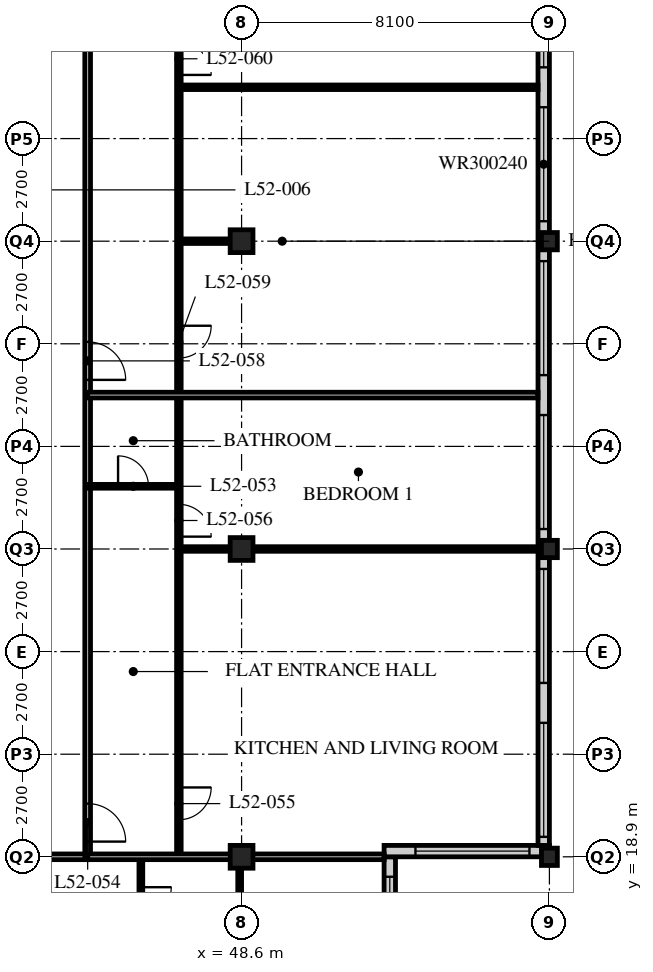
"""IFC4 building model, lengths in metres.
Left out: names, types, materials, properties, quantities, classifications, styles, units other than length and angle.
Written with IfcOpenShell. Run it as: python <this file> out.ifc"""

import sys

from ifc_helpers import new_model, si_unit, direction, frame, frame_2d, origin, origin_2d, place, context, subcontext, project, spatial, rectangle, hollow_rectangle, i_section, extrude, element, fill, save


model = new_model("IFC4")
c1 = context("Model", 3, precision=1e-05, world=origin(), true_north=direction((0.0, 1.0)))
c2 = subcontext(c1, "Body", "Model", "MODEL_VIEW")
j1 = project(units=[si_unit("LENGTHUNIT", "METRE"), si_unit("PLANEANGLEUNIT", "RADIAN")], contexts=[c1])
p1 = place(None, origin())
s1 = spatial("IfcSite", under=j1, at=p1, CompositionType="ELEMENT")
p2 = place(p1, origin())
s2 = spatial("IfcBuilding", under=s1, at=p2, CompositionType="ELEMENT")
p3 = place(p2, frame((0.0, 0.0, 202.8)))
s3 = spatial("IfcBuildingStorey", under=s2, at=p3, CompositionType="ELEMENT", Elevation=202.8)
for number, where, z_axis, x_axis in (
    (1, (48.6, 18.9, 0.0), (0.0, 0.0, 1.0), (1.0, 0.0, 0.0)),
    (2, (48.6, 27.0, 0.0), (0.0, 0.0, 1.0), (1.0, 0.0, 0.0)),
    (3, (48.6, 35.1, 0.0), (0.0, 0.0, 1.0), (1.0, 0.0, 0.0)),
):
    element("IfcColumn", number, at=place(p3, frame(where, z_axis=z_axis, x_axis=x_axis)), inside=s3, PredefinedType="COLUMN", context=c2, shape_type="SweptSolid", body=[
        extrude(hollow_rectangle(XDim=0.6, YDim=0.6, WallThickness=0.05, at=origin_2d()), origin(), (0.0, 0.0, 1.0), 3.6),
    ])
for number, where, z_axis, x_axis in (
    (4, (56.7, 18.9, 0.0), (0.0, 0.0, 1.0), (1.0, 0.0, 0.0)),
    (5, (56.7, 27.0, 0.0), (0.0, 0.0, 1.0), (1.0, 0.0, 0.0)),
    (6, (56.7, 35.1, 0.0), (0.0, 0.0, 1.0), (1.0, 0.0, 0.0)),
):
    element("IfcColumn", number, at=place(p3, frame(where, z_axis=z_axis, x_axis=x_axis)), inside=s3, PredefinedType="COLUMN", context=c2, shape_type="SweptSolid", body=[
        extrude(i_section(OverallWidth=0.418, OverallDepth=0.456, WebThickness=0.042, FlangeThickness=0.067, FilletRadius=0.015, at=origin_2d()), origin(), (0.0, 0.0, 1.0), 3.6),
    ])
p4 = place(p3, frame((52.5, 15.15, 0.0), z_axis=(0.0, 0.0, 1.0), x_axis=(0.0, 1.0, 0.0)))
e7 = element("IfcWall", 7, at=p4, inside=s3, PredefinedType="SOLIDWALL", context=c2, shape_type="SweptSolid", body=[
    extrude(rectangle(XDim=3.75, YDim=0.3, at=frame_2d((1.875, 0.0))), origin(), (0.0, 0.0, 1.0), 3.39),
])
p5 = place(p4, frame((0.225, 0.0, 0.6)))
e8 = element("IfcOpeningElement", 8, at=p5, cuts=e7, PredefinedType="OPENING", context=c2, shape_type="SweptSolid", body=[
    extrude(rectangle(XDim=3.0, YDim=2.0, at=frame_2d((1.5, 1.0))), frame((0.0, 0.16, 0.0), z_axis=(0.0, -1.0, 0.0), x_axis=(1.0, 0.0, 0.0)), (0.0, 0.0, 1.0), 0.32),
])
p6 = place(p3, frame((52.35, 19.05, 0.0), z_axis=(0.0, 0.0, 1.0), x_axis=(1.0, 0.0, 0.0)))
e9 = element("IfcWall", 9, at=p6, inside=s3, PredefinedType="SOLIDWALL", context=c2, shape_type="SweptSolid", body=[
    extrude(rectangle(XDim=4.35, YDim=0.3, at=frame_2d((2.175, 0.0))), origin(), (0.0, 0.0, 1.0), 3.39),
])
p7 = place(p6, frame((0.825, 0.0, 0.6)))
e10 = element("IfcOpeningElement", 10, at=p7, cuts=e9, PredefinedType="OPENING", context=c2, shape_type="SweptSolid", body=[
    extrude(rectangle(XDim=3.0, YDim=2.0, at=frame_2d((1.5, 1.0))), frame((0.0, 0.16, 0.0), z_axis=(0.0, -1.0, 0.0), x_axis=(1.0, 0.0, 0.0)), (0.0, 0.0, 1.0), 0.32),
])
p8 = place(p3, frame((56.55, 19.2, 0.0), z_axis=(0.0, 0.0, 1.0), x_axis=(0.0, 1.0, 0.0)))
e11 = element("IfcWall", 11, at=p8, inside=s3, PredefinedType="SOLIDWALL", context=c2, shape_type="SweptSolid", body=[
    extrude(rectangle(XDim=32.1, YDim=0.3, at=frame_2d((16.05, 0.0))), origin(), (0.0, 0.0, 1.0), 3.39),
])
p9 = place(p8, frame((0.225, 0.0, 0.6)))
e12 = element("IfcOpeningElement", 12, at=p9, cuts=e11, PredefinedType="OPENING", context=c2, shape_type="SweptSolid", body=[
    extrude(rectangle(XDim=3.0, YDim=2.4, at=frame_2d((1.5, 1.2))), frame((0.0, 0.16, 0.0), z_axis=(0.0, -1.0, 0.0), x_axis=(1.0, 0.0, 0.0)), (0.0, 0.0, 1.0), 0.32),
])
p10 = place(p8, frame((4.275, 0.0, 0.6)))
e13 = element("IfcOpeningElement", 13, at=p10, cuts=e11, PredefinedType="OPENING", context=c2, shape_type="SweptSolid", body=[
    extrude(rectangle(XDim=3.0, YDim=2.4, at=frame_2d((1.5, 1.2))), frame((0.0, 0.16, 0.0), z_axis=(0.0, -1.0, 0.0), x_axis=(1.0, 0.0, 0.0)), (0.0, 0.0, 1.0), 0.32),
])
p11 = place(p8, frame((8.325, 0.0, 0.6)))
e14 = element("IfcOpeningElement", 14, at=p11, cuts=e11, PredefinedType="OPENING", context=c2, shape_type="SweptSolid", body=[
    extrude(rectangle(XDim=3.0, YDim=2.4, at=frame_2d((1.5, 1.2))), frame((0.0, 0.16, 0.0), z_axis=(0.0, -1.0, 0.0), x_axis=(1.0, 0.0, 0.0)), (0.0, 0.0, 1.0), 0.32),
])
p12 = place(p8, frame((12.375, 0.0, 0.6)))
e15 = element("IfcOpeningElement", 15, at=p12, cuts=e11, PredefinedType="OPENING", context=c2, shape_type="SweptSolid", body=[
    extrude(rectangle(XDim=3.0, YDim=2.4, at=frame_2d((1.5, 1.2))), frame((0.0, 0.16, 0.0), z_axis=(0.0, -1.0, 0.0), x_axis=(1.0, 0.0, 0.0)), (0.0, 0.0, 1.0), 0.32),
])
p13 = place(p8, frame((16.425, 0.0, 0.6)))
e16 = element("IfcOpeningElement", 16, at=p13, cuts=e11, PredefinedType="OPENING", context=c2, shape_type="SweptSolid", body=[
    extrude(rectangle(XDim=3.0, YDim=2.4, at=frame_2d((1.5, 1.2))), frame((0.0, 0.16, 0.0), z_axis=(0.0, -1.0, 0.0), x_axis=(1.0, 0.0, 0.0)), (0.0, 0.0, 1.0), 0.32),
])
p14 = place(p8, frame((20.475, 0.0, 0.6)))
e17 = element("IfcOpeningElement", 17, at=p14, cuts=e11, PredefinedType="OPENING", context=c2, shape_type="SweptSolid", body=[
    extrude(rectangle(XDim=3.0, YDim=2.4, at=frame_2d((1.5, 1.2))), frame((0.0, 0.16, 0.0), z_axis=(0.0, -1.0, 0.0), x_axis=(1.0, 0.0, 0.0)), (0.0, 0.0, 1.0), 0.32),
])
p15 = place(p8, frame((24.525, 0.0, 0.6)))
e18 = element("IfcOpeningElement", 18, at=p15, cuts=e11, PredefinedType="OPENING", context=c2, shape_type="SweptSolid", body=[
    extrude(rectangle(XDim=3.0, YDim=2.4, at=frame_2d((1.5, 1.2))), frame((0.0, 0.16, 0.0), z_axis=(0.0, -1.0, 0.0), x_axis=(1.0, 0.0, 0.0)), (0.0, 0.0, 1.0), 0.32),
])
p16 = place(p8, frame((28.575, 0.0, 0.6)))
e19 = element("IfcOpeningElement", 19, at=p16, cuts=e11, PredefinedType="OPENING", context=c2, shape_type="SweptSolid", body=[
    extrude(rectangle(XDim=3.0, YDim=2.4, at=frame_2d((1.5, 1.2))), frame((0.0, 0.16, 0.0), z_axis=(0.0, -1.0, 0.0), x_axis=(1.0, 0.0, 0.0)), (0.0, 0.0, 1.0), 0.32),
])
p17 = place(p3, frame((8.1, 18.9, 0.0), z_axis=(0.0, 0.0, 1.0), x_axis=(1.0, 0.0, 0.0)))
e20 = element("IfcWall", 20, at=p17, inside=s3, PredefinedType="PARTITIONING", context=c2, shape_type="SweptSolid", body=[
    extrude(rectangle(XDim=36.45, YDim=0.15, at=frame_2d((18.225, 0.0))), origin(), (0.0, 0.0, 1.0), 2.778),
])
p18 = place(p17, frame((4.45, 0.0, 0.0)))
e21 = element("IfcOpeningElement", 21, at=p18, cuts=e20, PredefinedType="OPENING", context=c2, shape_type="SweptSolid", body=[
    extrude(rectangle(XDim=1.0, YDim=2.1, at=frame_2d((0.5, 1.05))), frame((0.0, 0.085, 0.0), z_axis=(0.0, -1.0, 0.0), x_axis=(1.0, 0.0, 0.0)), (0.0, 0.0, 1.0), 0.17),
])
p19 = place(p17, frame((12.55, 0.0, 0.0)))
e22 = element("IfcOpeningElement", 22, at=p19, cuts=e20, PredefinedType="OPENING", context=c2, shape_type="SweptSolid", body=[
    extrude(rectangle(XDim=1.0, YDim=2.1, at=frame_2d((0.5, 1.05))), frame((0.0, 0.085, 0.0), z_axis=(0.0, -1.0, 0.0), x_axis=(1.0, 0.0, 0.0)), (0.0, 0.0, 1.0), 0.17),
])
p20 = place(p17, frame((29.05, 0.0, 0.0)))
e23 = element("IfcOpeningElement", 23, at=p20, cuts=e20, PredefinedType="OPENING", context=c2, shape_type="SweptSolid", body=[
    extrude(rectangle(XDim=1.0, YDim=2.1, at=frame_2d((0.5, 1.05))), frame((0.0, 0.085, 0.0), z_axis=(0.0, -1.0, 0.0), x_axis=(1.0, 0.0, 0.0)), (0.0, 0.0, 1.0), 0.17),
])
p21 = place(p17, frame((2.625, 0.0, 0.0)))
e24 = element("IfcOpeningElement", 24, at=p21, cuts=e20, PredefinedType="OPENING", context=c2, shape_type="SweptSolid", body=[
    extrude(rectangle(XDim=1.0, YDim=2.1, at=frame_2d((0.5, 1.05))), frame((0.0, 0.085, 0.0), z_axis=(0.0, -1.0, 0.0), x_axis=(1.0, 0.0, 0.0)), (0.0, 0.0, 1.0), 0.17),
])
p22 = place(p17, frame((33.925, 0.0, 0.0)))
e25 = element("IfcOpeningElement", 25, at=p22, cuts=e20, PredefinedType="OPENING", context=c2, shape_type="SweptSolid", body=[
    extrude(rectangle(XDim=1.0, YDim=2.1, at=frame_2d((0.5, 1.05))), frame((0.0, 0.085, 0.0), z_axis=(0.0, -1.0, 0.0), x_axis=(1.0, 0.0, 0.0)), (0.0, 0.0, 1.0), 0.17),
])
p23 = place(p3, frame((44.55, 18.9, 0.0), z_axis=(0.0, 0.0, 1.0), x_axis=(0.0, 1.0, 0.0)))
e26 = element("IfcWall", 26, at=p23, inside=s3, PredefinedType="PARTITIONING", context=c2, shape_type="SweptSolid", body=[
    extrude(rectangle(XDim=28.35, YDim=0.15, at=frame_2d((14.175, 0.0))), origin(), (0.0, 0.0, 1.0), 3.39),
])
p24 = place(p23, frame((0.4, 0.0, 0.0)))
e27 = element("IfcOpeningElement", 27, at=p24, cuts=e26, PredefinedType="OPENING", context=c2, shape_type="SweptSolid", body=[
    extrude(rectangle(XDim=1.0, YDim=2.1, at=frame_2d((0.5, 1.05))), frame((0.0, 0.085, 0.0), z_axis=(0.0, -1.0, 0.0), x_axis=(1.0, 0.0, 0.0)), (0.0, 0.0, 1.0), 0.17),
])
p25 = place(p23, frame((12.55, 0.0, 0.0)))
e28 = element("IfcOpeningElement", 28, at=p25, cuts=e26, PredefinedType="OPENING", context=c2, shape_type="SweptSolid", body=[
    extrude(rectangle(XDim=1.0, YDim=2.1, at=frame_2d((0.5, 1.05))), frame((0.0, 0.085, 0.0), z_axis=(0.0, -1.0, 0.0), x_axis=(1.0, 0.0, 0.0)), (0.0, 0.0, 1.0), 0.17),
])
p26 = place(p23, frame((26.65, 0.0, 0.0)))
e29 = element("IfcOpeningElement", 29, at=p26, cuts=e26, PredefinedType="OPENING", context=c2, shape_type="SweptSolid", body=[
    extrude(rectangle(XDim=1.0, YDim=2.1, at=frame_2d((0.5, 1.05))), frame((0.0, 0.085, 0.0), z_axis=(0.0, -1.0, 0.0), x_axis=(1.0, 0.0, 0.0)), (0.0, 0.0, 1.0), 0.17),
])
p27 = place(p3, frame((46.95, 18.9, 0.0), z_axis=(0.0, 0.0, 1.0), x_axis=(0.0, 1.0, 0.0)))
e30 = element("IfcWall", 30, at=p27, inside=s3, PredefinedType="PARTITIONING", context=c2, shape_type="SweptSolid", body=[
    extrude(rectangle(XDim=24.3, YDim=0.12, at=frame_2d((12.15, 0.0))), origin(), (0.0, 0.0, 1.0), 3.39),
])
p28 = place(p27, frame((0.975, 0.0, 0.0)))
e31 = element("IfcOpeningElement", 31, at=p28, cuts=e30, PredefinedType="OPENING", context=c2, shape_type="SweptSolid", body=[
    extrude(rectangle(XDim=0.85, YDim=2.1, at=frame_2d((0.425, 1.05))), frame((0.0, 0.07, 0.0), z_axis=(0.0, -1.0, 0.0), x_axis=(1.0, 0.0, 0.0)), (0.0, 0.0, 1.0), 0.14),
])
p29 = place(p27, frame((8.425, 0.0, 0.0)))
e32 = element("IfcOpeningElement", 32, at=p29, cuts=e30, PredefinedType="OPENING", context=c2, shape_type="SweptSolid", body=[
    extrude(rectangle(XDim=0.85, YDim=2.1, at=frame_2d((0.425, 1.05))), frame((0.0, 0.07, 0.0), z_axis=(0.0, -1.0, 0.0), x_axis=(1.0, 0.0, 0.0)), (0.0, 0.0, 1.0), 0.14),
])
p30 = place(p27, frame((13.125, 0.0, 0.0)))
e33 = element("IfcOpeningElement", 33, at=p30, cuts=e30, PredefinedType="OPENING", context=c2, shape_type="SweptSolid", body=[
    extrude(rectangle(XDim=0.85, YDim=2.1, at=frame_2d((0.425, 1.05))), frame((0.0, 0.07, 0.0), z_axis=(0.0, -1.0, 0.0), x_axis=(1.0, 0.0, 0.0)), (0.0, 0.0, 1.0), 0.14),
])
p31 = place(p27, frame((20.575, 0.0, 0.0)))
e34 = element("IfcOpeningElement", 34, at=p31, cuts=e30, PredefinedType="OPENING", context=c2, shape_type="SweptSolid", body=[
    extrude(rectangle(XDim=0.85, YDim=2.1, at=frame_2d((0.425, 1.05))), frame((0.0, 0.07, 0.0), z_axis=(0.0, -1.0, 0.0), x_axis=(1.0, 0.0, 0.0)), (0.0, 0.0, 1.0), 0.14),
])
p32 = place(p3, frame((44.55, 28.65, 0.0), z_axis=(0.0, 0.0, 1.0), x_axis=(1.0, 0.0, 0.0)))
e35 = element("IfcWall", 35, at=p32, inside=s3, PredefinedType="PARTITIONING", context=c2, shape_type="SweptSolid", body=[
    extrude(rectangle(XDim=2.4, YDim=0.1, at=frame_2d((1.2, 0.0))), origin(), (0.0, 0.0, 1.0), 3.39),
])
p33 = place(p32, frame((0.8, 0.0, 0.0)))
e36 = element("IfcOpeningElement", 36, at=p33, cuts=e35, PredefinedType="OPENING", context=c2, shape_type="SweptSolid", body=[
    extrude(rectangle(XDim=0.8, YDim=2.1, at=frame_2d((0.4, 1.05))), frame((0.0, 0.06, 0.0), z_axis=(0.0, -1.0, 0.0), x_axis=(1.0, 0.0, 0.0)), (0.0, 0.0, 1.0), 0.12),
])
p34 = place(p3, frame((46.95, 27.0, 0.0), z_axis=(0.0, 0.0, 1.0), x_axis=(1.0, 0.0, 0.0)))
e37 = element("IfcWall", 37, at=p34, inside=s3, PredefinedType="PARTITIONING", context=c2, shape_type="SweptSolid", body=[
    extrude(rectangle(XDim=9.45, YDim=0.12, at=frame_2d((4.725, 0.0))), origin(), (0.0, 0.0, 1.0), 2.778),
])
p35 = place(p3, frame((44.55, 31.05, 0.0), z_axis=(0.0, 0.0, 1.0), x_axis=(1.0, 0.0, 0.0)))
e38 = element("IfcWall", 38, at=p35, inside=s3, PredefinedType="PARTITIONING", context=c2, shape_type="SweptSolid", body=[
    extrude(rectangle(XDim=11.85, YDim=0.15, at=frame_2d((5.925, 0.0))), origin(), (0.0, 0.0, 1.0), 3.39),
])
p36 = place(p3, frame((46.95, 39.15, 0.0), z_axis=(0.0, 0.0, 1.0), x_axis=(1.0, 0.0, 0.0)))
e39 = element("IfcWall", 39, at=p36, inside=s3, PredefinedType="PARTITIONING", context=c2, shape_type="SweptSolid", body=[
    extrude(rectangle(XDim=9.45, YDim=0.12, at=frame_2d((4.725, 0.0))), origin(), (0.0, 0.0, 1.0), 3.39),
])
p37 = place(p3, frame((45.95, 18.9, 0.0), z_axis=(0.0, 0.0, 1.0), x_axis=(0.0, -1.0, 0.0)))
e40 = element("IfcWall", 40, at=p37, inside=s3, PredefinedType="PARTITIONING", context=c2, shape_type="SweptSolid", body=[
    extrude(rectangle(XDim=2.4, YDim=0.1, at=frame_2d((1.2, 0.0))), origin(), (0.0, 0.0, 1.0), 3.39),
])
p38 = place(p37, frame((0.8, 0.0, 0.0)))
e41 = element("IfcOpeningElement", 41, at=p38, cuts=e40, PredefinedType="OPENING", context=c2, shape_type="SweptSolid", body=[
    extrude(rectangle(XDim=0.8, YDim=2.1, at=frame_2d((0.4, 1.05))), frame((0.0, 0.06, 0.0), z_axis=(0.0, -1.0, 0.0), x_axis=(1.0, 0.0, 0.0)), (0.0, 0.0, 1.0), 0.12),
])
p39 = place(p3, frame((48.55, 18.9, 0.0), z_axis=(0.0, 0.0, 1.0), x_axis=(0.0, -1.0, 0.0)))
e42 = element("IfcWall", 42, at=p39, inside=s3, PredefinedType="PARTITIONING", context=c2, shape_type="SweptSolid", body=[
    extrude(rectangle(XDim=2.4, YDim=0.1, at=frame_2d((1.2, 0.0))), origin(), (0.0, 0.0, 1.0), 2.778),
])
p40 = place(p3, frame((44.55, 18.9, 0.0), z_axis=(0.0, 0.0, 1.0), x_axis=(1.0, 0.0, 0.0)))
e43 = element("IfcWall", 43, at=p40, inside=s3, PredefinedType="PARTITIONING", context=c2, shape_type="SweptSolid", body=[
    extrude(rectangle(XDim=7.8, YDim=0.15, at=frame_2d((3.9, 0.0))), origin(), (0.0, 0.0, 1.0), 2.778),
])
p41 = place(p3, frame((46.95, 35.1, 0.0), z_axis=(0.0, 0.0, 1.0), x_axis=(1.0, 0.0, 0.0)))
e44 = element("IfcWall", 44, at=p41, inside=s3, PredefinedType="PARTITIONING", context=c2, shape_type="SweptSolid", body=[
    extrude(rectangle(XDim=1.35, YDim=0.12, at=frame_2d((0.675, 0.0))), origin(), (0.0, 0.0, 1.0), 2.778),
])
p42 = place(p5, origin())
e45 = element("IfcWindow", 45, at=p42, inside=s3, PartitioningType="SINGLE_PANEL", PredefinedType="WINDOW", context=c2, shape_type="SweptSolid", body=[
    extrude(rectangle(XDim=3.0, YDim=2.0, at=frame_2d((1.5, 1.0))), frame((0.0, 0.03, 0.0), z_axis=(0.0, -1.0, 0.0), x_axis=(1.0, 0.0, 0.0)), (0.0, 0.0, 1.0), 0.06),
])
fill(e8, e45)
p43 = place(p7, origin())
e46 = element("IfcWindow", 46, at=p43, inside=s3, PartitioningType="SINGLE_PANEL", PredefinedType="WINDOW", context=c2, shape_type="SweptSolid", body=[
    extrude(rectangle(XDim=3.0, YDim=2.0, at=frame_2d((1.5, 1.0))), frame((0.0, 0.03, 0.0), z_axis=(0.0, -1.0, 0.0), x_axis=(1.0, 0.0, 0.0)), (0.0, 0.0, 1.0), 0.06),
])
fill(e10, e46)
p44 = place(p9, origin())
e47 = element("IfcWindow", 47, at=p44, inside=s3, PartitioningType="SINGLE_PANEL", PredefinedType="WINDOW", context=c2, shape_type="SweptSolid", body=[
    extrude(rectangle(XDim=3.0, YDim=2.4, at=frame_2d((1.5, 1.2))), frame((0.0, 0.03, 0.0), z_axis=(0.0, -1.0, 0.0), x_axis=(1.0, 0.0, 0.0)), (0.0, 0.0, 1.0), 0.06),
])
fill(e12, e47)
p45 = place(p10, origin())
e48 = element("IfcWindow", 48, at=p45, inside=s3, PartitioningType="SINGLE_PANEL", PredefinedType="WINDOW", context=c2, shape_type="SweptSolid", body=[
    extrude(rectangle(XDim=3.0, YDim=2.4, at=frame_2d((1.5, 1.2))), frame((0.0, 0.03, 0.0), z_axis=(0.0, -1.0, 0.0), x_axis=(1.0, 0.0, 0.0)), (0.0, 0.0, 1.0), 0.06),
])
fill(e13, e48)
p46 = place(p11, origin())
e49 = element("IfcWindow", 49, at=p46, inside=s3, PartitioningType="SINGLE_PANEL", PredefinedType="WINDOW", context=c2, shape_type="SweptSolid", body=[
    extrude(rectangle(XDim=3.0, YDim=2.4, at=frame_2d((1.5, 1.2))), frame((0.0, 0.03, 0.0), z_axis=(0.0, -1.0, 0.0), x_axis=(1.0, 0.0, 0.0)), (0.0, 0.0, 1.0), 0.06),
])
fill(e14, e49)
p47 = place(p12, origin())
e50 = element("IfcWindow", 50, at=p47, inside=s3, PartitioningType="SINGLE_PANEL", PredefinedType="WINDOW", context=c2, shape_type="SweptSolid", body=[
    extrude(rectangle(XDim=3.0, YDim=2.4, at=frame_2d((1.5, 1.2))), frame((0.0, 0.03, 0.0), z_axis=(0.0, -1.0, 0.0), x_axis=(1.0, 0.0, 0.0)), (0.0, 0.0, 1.0), 0.06),
])
fill(e15, e50)
p48 = place(p13, origin())
e51 = element("IfcWindow", 51, at=p48, inside=s3, PartitioningType="SINGLE_PANEL", PredefinedType="WINDOW", context=c2, shape_type="SweptSolid", body=[
    extrude(rectangle(XDim=3.0, YDim=2.4, at=frame_2d((1.5, 1.2))), frame((0.0, 0.03, 0.0), z_axis=(0.0, -1.0, 0.0), x_axis=(1.0, 0.0, 0.0)), (0.0, 0.0, 1.0), 0.06),
])
fill(e16, e51)
p49 = place(p14, origin())
e52 = element("IfcWindow", 52, at=p49, inside=s3, PartitioningType="SINGLE_PANEL", PredefinedType="WINDOW", context=c2, shape_type="SweptSolid", body=[
    extrude(rectangle(XDim=3.0, YDim=2.4, at=frame_2d((1.5, 1.2))), frame((0.0, 0.03, 0.0), z_axis=(0.0, -1.0, 0.0), x_axis=(1.0, 0.0, 0.0)), (0.0, 0.0, 1.0), 0.06),
])
fill(e17, e52)
p50 = place(p33, origin())
e53 = element("IfcDoor", 53, at=p50, inside=s3, OperationType="SINGLE_SWING_LEFT", PredefinedType="DOOR", context=c2, shape_type="SweptSolid", body=[
    extrude(rectangle(XDim=0.8, YDim=2.1, at=frame_2d((0.4, 1.05))), frame((0.0, 0.025, 0.0), z_axis=(0.0, -1.0, 0.0), x_axis=(1.0, 0.0, 0.0)), (0.0, 0.0, 1.0), 0.05),
])
fill(e36, e53)
p51 = place(p24, origin())
e54 = element("IfcDoor", 54, at=p51, inside=s3, OperationType="SINGLE_SWING_RIGHT", PredefinedType="DOOR", context=c2, shape_type="SweptSolid", body=[
    extrude(rectangle(XDim=1.0, YDim=2.1, at=frame_2d((0.5, 1.05))), frame((0.0, 0.025, 0.0), z_axis=(0.0, -1.0, 0.0), x_axis=(1.0, 0.0, 0.0)), (0.0, 0.0, 1.0), 0.05),
])
fill(e27, e54)
p52 = place(p28, origin())
e55 = element("IfcDoor", 55, at=p52, inside=s3, OperationType="SINGLE_SWING_LEFT", PredefinedType="DOOR", context=c2, shape_type="SweptSolid", body=[
    extrude(rectangle(XDim=0.85, YDim=2.1, at=frame_2d((0.425, 1.05))), frame((0.0, 0.025, 0.0), z_axis=(0.0, -1.0, 0.0), x_axis=(1.0, 0.0, 0.0)), (0.0, 0.0, 1.0), 0.05),
])
fill(e31, e55)
p53 = place(p29, origin())
e56 = element("IfcDoor", 56, at=p53, inside=s3, OperationType="SINGLE_SWING_RIGHT", PredefinedType="DOOR", context=c2, shape_type="SweptSolid", body=[
    extrude(rectangle(XDim=0.85, YDim=2.1, at=frame_2d((0.425, 1.05))), frame((0.0, 0.025, 0.0), z_axis=(0.0, -1.0, 0.0), x_axis=(1.0, 0.0, 0.0)), (0.0, 0.0, 1.0), 0.05),
])
fill(e32, e56)
p54 = place(p25, origin())
e57 = element("IfcDoor", 57, at=p54, inside=s3, OperationType="SINGLE_SWING_RIGHT", PredefinedType="DOOR", context=c2, shape_type="SweptSolid", body=[
    extrude(rectangle(XDim=1.0, YDim=2.1, at=frame_2d((0.5, 1.05))), frame((0.0, 0.025, 0.0), z_axis=(0.0, -1.0, 0.0), x_axis=(1.0, 0.0, 0.0)), (0.0, 0.0, 1.0), 0.05),
])
fill(e28, e57)
p55 = place(p30, origin())
e58 = element("IfcDoor", 58, at=p55, inside=s3, OperationType="SINGLE_SWING_LEFT", PredefinedType="DOOR", context=c2, shape_type="SweptSolid", body=[
    extrude(rectangle(XDim=0.85, YDim=2.1, at=frame_2d((0.425, 1.05))), frame((0.0, 0.025, 0.0), z_axis=(0.0, -1.0, 0.0), x_axis=(1.0, 0.0, 0.0)), (0.0, 0.0, 1.0), 0.05),
])
fill(e33, e58)
p56 = place(p31, origin())
e59 = element("IfcDoor", 59, at=p56, inside=s3, OperationType="SINGLE_SWING_RIGHT", PredefinedType="DOOR", context=c2, shape_type="SweptSolid", body=[
    extrude(rectangle(XDim=0.85, YDim=2.1, at=frame_2d((0.425, 1.05))), frame((0.0, 0.025, 0.0), z_axis=(0.0, -1.0, 0.0), x_axis=(1.0, 0.0, 0.0)), (0.0, 0.0, 1.0), 0.05),
])
fill(e34, e59)
p57 = place(p38, origin())
e60 = element("IfcDoor", 60, at=p57, inside=s3, OperationType="SINGLE_SWING_LEFT", PredefinedType="DOOR", context=c2, shape_type="SweptSolid", body=[
    extrude(rectangle(XDim=0.8, YDim=2.1, at=frame_2d((0.4, 1.05))), frame((0.0, 0.025, 0.0), z_axis=(0.0, -1.0, 0.0), x_axis=(1.0, 0.0, 0.0)), (0.0, 0.0, 1.0), 0.05),
])
fill(e41, e60)
save(model, sys.argv[1])
